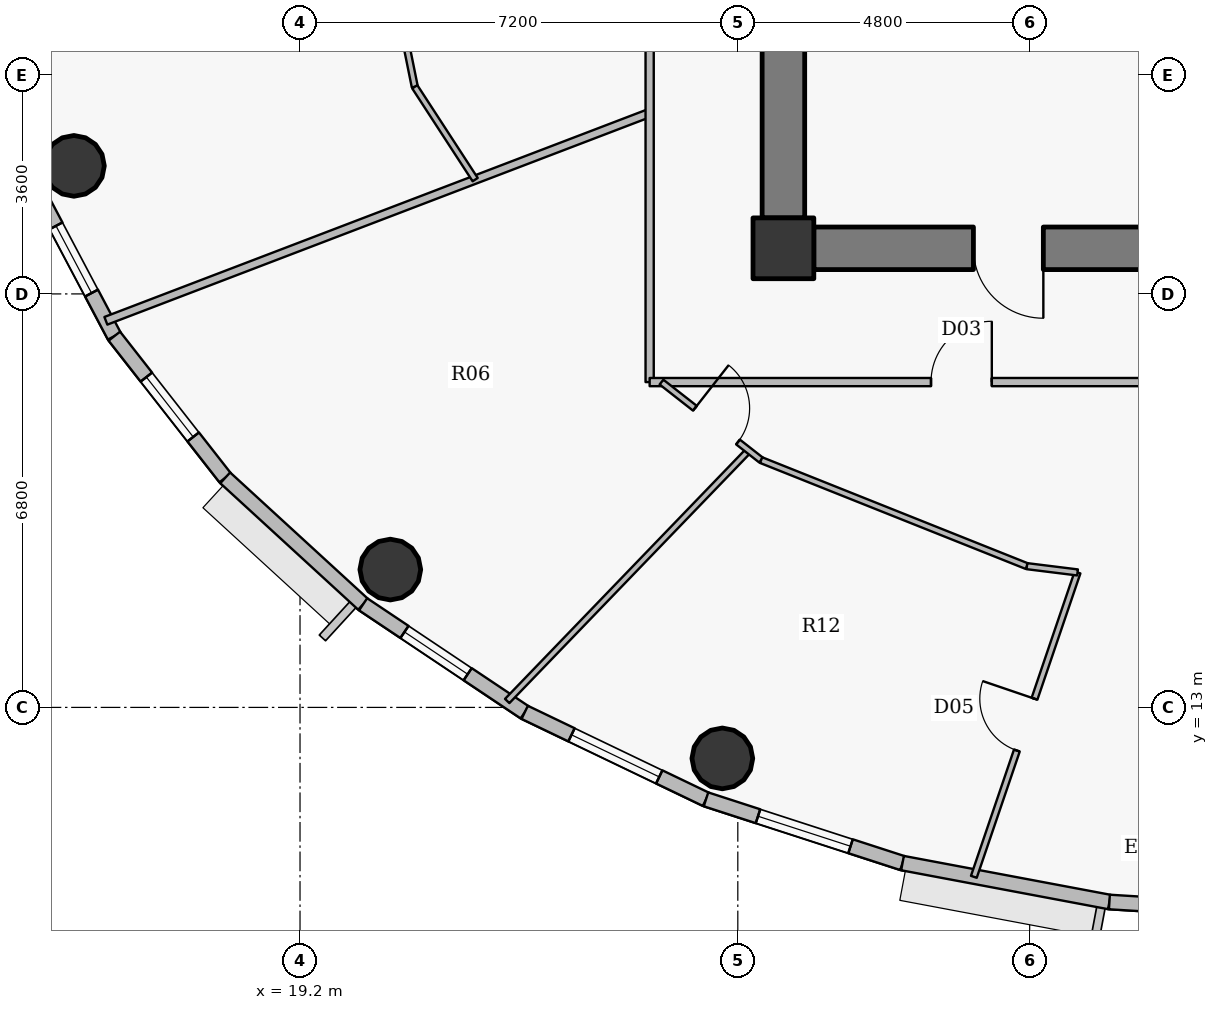
"""IFC4 building model, lengths in metres.
Left out: names, types, materials, properties, quantities, classifications, styles, units other than length and angle.
Written with IfcOpenShell. Run it as: python <this file> out.ifc"""

import sys

from ifc_helpers import new_model, si_unit, direction, frame, frame_2d, origin, origin_2d, place, context, subcontext, project, spatial, rectangle, hollow_circle, extrude, source, transform, mapped, element, fill, save


model = new_model("IFC4")
c1 = context("Model", 3, precision=1e-05, world=origin(), true_north=direction((0.0, 1.0)))
c2 = subcontext(c1, "Body", "Model", "MODEL_VIEW")
j1 = project(units=[si_unit("LENGTHUNIT", "METRE"), si_unit("PLANEANGLEUNIT", "RADIAN")], contexts=[c1])
p1 = place(None, origin())
s1 = spatial("IfcSite", under=j1, at=p1, CompositionType="ELEMENT")
p2 = place(p1, origin())
s2 = spatial("IfcBuilding", under=s1, at=p2, CompositionType="ELEMENT")
p3 = place(p2, frame((0.0, 0.0, 284.25)))
s3 = spatial("IfcBuildingStorey", under=s2, at=p3, CompositionType="ELEMENT", Elevation=284.25)
p4 = place(p3, frame((27.15, 20.55, 0.0), z_axis=(0.0, 0.0, 1.0), x_axis=(1.0, 0.0, 0.0)))
e1 = element("IfcColumn", 1, at=p4, inside=s3, PredefinedType="COLUMN", context=c2, shape_type="SweptSolid", body=[
    extrude(rectangle(XDim=1.0, YDim=1.0, at=origin_2d()), origin(), (0.0, 0.0, 1.0), 3.75),
])
p5 = place(p3, frame((44.35, 20.55, 0.0), z_axis=(0.0, 0.0, 1.0), x_axis=(-1.0, 0.0, 0.0)))
e2 = element("IfcWall", 2, at=p5, inside=s3, PredefinedType="SHEAR", context=c2, shape_type="SweptSolid", body=[
    extrude(rectangle(XDim=16.7, YDim=0.7, at=frame_2d((8.35, 0.0))), origin(), (0.0, 0.0, 1.0), 3.05),
])
p6 = place(p5, frame((12.925, 0.0, 0.0)))
e3 = element("IfcOpeningElement", 3, at=p6, cuts=e2, PredefinedType="OPENING", context=c2, shape_type="SweptSolid", body=[
    extrude(rectangle(XDim=1.15, YDim=2.15, at=origin_2d()), frame((0.575, 0.36, 1.075), z_axis=(0.0, -1.0, 0.0), x_axis=(1.0, 0.0, 0.0)), (0.0, 0.0, 1.0), 0.72),
])
p7 = place(p5, frame((9.1, 0.0, 0.0)))
e4 = element("IfcOpeningElement", 4, at=p7, cuts=e2, PredefinedType="OPENING", context=c2, shape_type="SweptSolid", body=[
    extrude(rectangle(XDim=1.15, YDim=2.15, at=origin_2d()), frame((0.575, 0.36, 1.075), z_axis=(0.0, -1.0, 0.0), x_axis=(1.0, 0.0, 0.0)), (0.0, 0.0, 1.0), 0.72),
])
p8 = place(p3, frame((27.15, 21.05, 0.0), z_axis=(0.0, 0.0, 1.0), x_axis=(0.0, 1.0, 0.0)))
e5 = element("IfcWall", 5, at=p8, inside=s3, PredefinedType="SHEAR", context=c2, shape_type="SweptSolid", body=[
    extrude(rectangle(XDim=11.9, YDim=0.7, at=frame_2d((5.95, 0.0))), origin(), (0.0, 0.0, 1.0), 3.05),
])
for number, where, z_axis, x_axis in (
    (6, (15.481, 21.906, 0.0), (0.0, 0.0, 1.0), (1.0, 0.0, 0.0)),
    (7, (20.685, 15.267, 0.0), (0.0, 0.0, 1.0), (1.0, 0.0, 0.0)),
    (8, (26.146, 12.161, 0.0), (0.0, 0.0, 1.0), (1.0, 0.0, 0.0)),
):
    element("IfcColumn", number, at=place(p3, frame(where, z_axis=z_axis, x_axis=x_axis)), inside=s3, PredefinedType="COLUMN", context=c2, shape_type="SweptSolid", body=[
        extrude(hollow_circle(Radius=0.5, WallThickness=0.032, at=origin_2d()), origin(), (0.0, 0.0, 1.0), 3.75),
    ])
p9 = place(p3, frame((16.146, 19.105, 0.0), z_axis=(0.0, 0.0, 1.0), x_axis=(-0.467628269026, 0.883925224218, 0.0)))
e9 = element("IfcWall", 9, at=p9, inside=s3, PredefinedType="SOLIDWALL", context=c2, shape_type="SweptSolid", body=[
    extrude(rectangle(XDim=2.854, YDim=0.24, at=frame_2d((1.427, 0.0))), origin(), (0.0, 0.0, 1.0), 3.5),
])
p10 = place(p9, frame((0.802, 0.0, 0.9)))
e10 = element("IfcOpeningElement", 10, at=p10, cuts=e9, PredefinedType="OPENING", context=c2, shape_type="SweptSolid", body=[
    extrude(rectangle(XDim=1.25, YDim=1.65, at=origin_2d()), frame((0.625, 0.13, 0.825), z_axis=(0.0, -1.0, 0.0), x_axis=(1.0, 0.0, 0.0)), (0.0, 0.0, 1.0), 0.26),
])
p11 = place(p3, frame((17.97, 16.775, 0.0), z_axis=(0.0, 0.0, 1.0), x_axis=(-0.616337186556, 0.787482363275, 0.0)))
e11 = element("IfcWall", 11, at=p11, inside=s3, PredefinedType="SOLIDWALL", context=c2, shape_type="SweptSolid", body=[
    extrude(rectangle(XDim=2.958, YDim=0.24, at=frame_2d((1.479, 0.0))), origin(), (0.0, 0.0, 1.0), 3.5),
])
p12 = place(p11, frame((0.854, 0.0, 0.9)))
e12 = element("IfcOpeningElement", 12, at=p12, cuts=e11, PredefinedType="OPENING", context=c2, shape_type="SweptSolid", body=[
    extrude(rectangle(XDim=1.25, YDim=1.65, at=origin_2d()), frame((0.625, 0.13, 0.825), z_axis=(0.0, -1.0, 0.0), x_axis=(1.0, 0.0, 0.0)), (0.0, 0.0, 1.0), 0.26),
])
p13 = place(p3, frame((20.238, 14.696, 0.0), z_axis=(0.0, 0.0, 1.0), x_axis=(-0.737068506972, 0.675818034703, 0.0)))
e13 = element("IfcWall", 13, at=p13, inside=s3, PredefinedType="SOLIDWALL", context=c2, shape_type="SweptSolid", body=[
    extrude(rectangle(XDim=3.077, YDim=0.24, at=frame_2d((1.539, 0.0))), origin(), (0.0, 0.0, 1.0), 3.5),
])
p14 = place(p3, frame((22.896, 12.918, 0.0), z_axis=(0.0, 0.0, 1.0), x_axis=(-0.831250592635, 0.55589787933, 0.0)))
e14 = element("IfcWall", 14, at=p14, inside=s3, PredefinedType="SOLIDWALL", context=c2, shape_type="SweptSolid", body=[
    extrude(rectangle(XDim=3.197, YDim=0.24, at=frame_2d((1.599, 0.0))), origin(), (0.0, 0.0, 1.0), 3.5),
])
p15 = place(p14, frame((1.129, 0.0, 0.9)))
e15 = element("IfcOpeningElement", 15, at=p15, cuts=e14, PredefinedType="OPENING", context=c2, shape_type="SweptSolid", body=[
    extrude(rectangle(XDim=1.25, YDim=1.65, at=origin_2d()), frame((0.625, 0.13, 0.825), z_axis=(0.0, -1.0, 0.0), x_axis=(1.0, 0.0, 0.0)), (0.0, 0.0, 1.0), 0.26),
])
p16 = place(p3, frame((25.877, 11.488, 0.0), z_axis=(0.0, 0.0, 1.0), x_axis=(-0.901573741254, 0.43262546051, 0.0)))
e16 = element("IfcWall", 16, at=p16, inside=s3, PredefinedType="SOLIDWALL", context=c2, shape_type="SweptSolid", body=[
    extrude(rectangle(XDim=3.307, YDim=0.24, at=frame_2d((1.653, 0.0))), origin(), (0.0, 0.0, 1.0), 3.5),
])
p17 = place(p16, frame((0.853, 0.0, 0.9)))
e17 = element("IfcOpeningElement", 17, at=p17, cuts=e16, PredefinedType="OPENING", context=c2, shape_type="SweptSolid", body=[
    extrude(rectangle(XDim=1.6, YDim=1.75, at=origin_2d()), frame((0.8, 0.13, 0.875), z_axis=(0.0, -1.0, 0.0), x_axis=(1.0, 0.0, 0.0)), (0.0, 0.0, 1.0), 0.26),
])
p18 = place(p3, frame((29.109, 10.44, 0.0), z_axis=(0.0, 0.0, 1.0), x_axis=(-0.95123136723, 0.308478339592, 0.0)))
e18 = element("IfcWall", 18, at=p18, inside=s3, PredefinedType="SOLIDWALL", context=c2, shape_type="SweptSolid", body=[
    extrude(rectangle(XDim=3.398, YDim=0.24, at=frame_2d((1.699, 0.0))), origin(), (0.0, 0.0, 1.0), 3.5),
])
p19 = place(p18, frame((0.899, 0.0, 0.9)))
e19 = element("IfcOpeningElement", 19, at=p19, cuts=e18, PredefinedType="OPENING", context=c2, shape_type="SweptSolid", body=[
    extrude(rectangle(XDim=1.6, YDim=1.75, at=origin_2d()), frame((0.8, 0.13, 0.875), z_axis=(0.0, -1.0, 0.0), x_axis=(1.0, 0.0, 0.0)), (0.0, 0.0, 1.0), 0.26),
])
p20 = place(p3, frame((32.511, 9.8, 0.0), z_axis=(0.0, 0.0, 1.0), x_axis=(-0.982782655757, 0.184765395959, 0.0)))
e20 = element("IfcWall", 20, at=p20, inside=s3, PredefinedType="SOLIDWALL", context=c2, shape_type="SweptSolid", body=[
    extrude(rectangle(XDim=3.462, YDim=0.24, at=frame_2d((1.731, 0.0))), origin(), (0.0, 0.0, 1.0), 3.5),
])
p21 = place(p3, frame((36.0, 9.585, 0.0), z_axis=(0.0, 0.0, 1.0), x_axis=(-0.998104946479, 0.061534671648, 0.0)))
e21 = element("IfcWall", 21, at=p21, inside=s3, PredefinedType="SOLIDWALL", context=c2, shape_type="SweptSolid", body=[
    extrude(rectangle(XDim=3.495, YDim=0.24, at=frame_2d((1.748, 0.0))), origin(), (0.0, 0.0, 1.0), 3.5),
])
p22 = place(p21, frame((1.123, 0.0, 0.9)))
e22 = element("IfcOpeningElement", 22, at=p22, cuts=e21, PredefinedType="OPENING", context=c2, shape_type="SweptSolid", body=[
    extrude(rectangle(XDim=1.25, YDim=1.65, at=origin_2d()), frame((0.625, 0.13, 0.825), z_axis=(0.0, -1.0, 0.0), x_axis=(1.0, 0.0, 0.0)), (0.0, 0.0, 1.0), 0.26),
])
p23 = place(p3, frame((16.007, 19.358, 0.0), z_axis=(0.0, 0.0, 1.0), x_axis=(0.934094110355, 0.35702687994, 0.0)))
e23 = element("IfcWall", 23, at=p23, inside=s3, PredefinedType="PARTITIONING", context=c2, shape_type="SweptSolid", body=[
    extrude(rectangle(XDim=9.574, YDim=0.135, at=frame_2d((4.787, 0.0))), origin(), (0.0, 0.0, 1.0), 2.985),
])
p24 = place(p3, frame((20.32, 27.0, 0.0), z_axis=(0.0, 0.0, 1.0), x_axis=(0.198226068862, -0.980156327135, 0.0)))
e24 = element("IfcWall", 24, at=p24, inside=s3, PredefinedType="PARTITIONING", context=c2, shape_type="SweptSolid", body=[
    extrude(rectangle(XDim=3.871, YDim=0.1, at=frame_2d((1.936, 0.0))), origin(), (0.0, 0.0, 1.0), 3.035),
])
p25 = place(p3, frame((21.087, 23.206, 0.0), z_axis=(0.0, 0.0, 1.0), x_axis=(0.545384128846, -0.838186227519, 0.0)))
e25 = element("IfcWall", 25, at=p25, inside=s3, PredefinedType="PARTITIONING", context=c2, shape_type="SweptSolid", body=[
    extrude(rectangle(XDim=1.821, YDim=0.1, at=frame_2d((0.911, 0.0))), origin(), (0.0, 0.0, 1.0), 3.035),
])
p26 = place(p3, frame((22.607, 13.105, 0.0), z_axis=(0.0, 0.0, 1.0), x_axis=(0.693978480191, 0.71999574237, 0.0)))
e26 = element("IfcWall", 26, at=p26, inside=s3, PredefinedType="PARTITIONING", context=c2, shape_type="SweptSolid", body=[
    extrude(rectangle(XDim=5.724, YDim=0.1, at=frame_2d((2.862, 0.0))), origin(), (0.0, 0.0, 1.0), 2.985),
])
p27 = place(p3, frame((24.95, 18.35, 0.0), z_axis=(0.0, 0.0, 1.0), x_axis=(0.0, 1.0, 0.0)))
e27 = element("IfcWall", 27, at=p27, inside=s3, PredefinedType="PARTITIONING", context=c2, shape_type="SweptSolid", body=[
    extrude(rectangle(XDim=17.147, YDim=0.135, at=frame_2d((8.574, 0.0))), origin(), (0.0, 0.0, 1.0), 3.035),
])
p28 = place(p27, frame((10.267, 0.0, 0.0)))
e28 = element("IfcOpeningElement", 28, at=p28, cuts=e27, PredefinedType="OPENING", context=c2, shape_type="SweptSolid", body=[
    extrude(rectangle(XDim=1.0, YDim=2.15, at=origin_2d()), frame((0.5, 0.078, 1.075), z_axis=(0.0, -1.0, 0.0), x_axis=(1.0, 0.0, 0.0)), (0.0, 0.0, 1.0), 0.155),
])
p29 = place(p3, frame((24.95, 18.35, 0.0), z_axis=(0.0, 0.0, 1.0), x_axis=(1.0, 0.0, 0.0)))
e29 = element("IfcWall", 29, at=p29, inside=s3, PredefinedType="PARTITIONING", context=c2, shape_type="SweptSolid", body=[
    extrude(rectangle(XDim=10.1, YDim=0.135, at=frame_2d((5.05, 0.0))), origin(), (0.0, 0.0, 1.0), 3.035),
])
p30 = place(p29, frame((4.627, 0.0, 0.0)))
e30 = element("IfcOpeningElement", 30, at=p30, cuts=e29, PredefinedType="OPENING", context=c2, shape_type="SweptSolid", body=[
    extrude(rectangle(XDim=1.0, YDim=2.15, at=origin_2d()), frame((0.5, 0.078, 1.075), z_axis=(0.0, -1.0, 0.0), x_axis=(1.0, 0.0, 0.0)), (0.0, 0.0, 1.0), 0.155),
])
p31 = place(p3, frame((25.145, 18.35, 0.0), z_axis=(0.0, 0.0, 1.0), x_axis=(0.787326747019, -0.616535962803, 0.0)))
e31 = element("IfcWall", 31, at=p31, inside=s3, PredefinedType="PARTITIONING", context=c2, shape_type="SweptSolid", body=[
    extrude(rectangle(XDim=2.081, YDim=0.1, at=frame_2d((1.041, 0.0))), origin(), (0.0, 0.0, 1.0), 3.5),
])
p32 = place(p31, frame((0.698, 0.0, 0.0)))
e32 = element("IfcOpeningElement", 32, at=p32, cuts=e31, PredefinedType="OPENING", context=c2, shape_type="SweptSolid", body=[
    extrude(rectangle(XDim=0.9, YDim=2.1, at=origin_2d()), frame((0.45, 0.06, 1.05), z_axis=(0.0, -1.0, 0.0), x_axis=(1.0, 0.0, 0.0)), (0.0, 0.0, 1.0), 0.12),
])
p33 = place(p3, frame((26.783, 17.067, 0.0), z_axis=(0.0, 0.0, 1.0), x_axis=(0.928809047774, -0.370558703544, 0.0)))
e33 = element("IfcWall", 33, at=p33, inside=s3, PredefinedType="PARTITIONING", context=c2, shape_type="SweptSolid", body=[
    extrude(rectangle(XDim=4.706, YDim=0.1, at=frame_2d((2.353, 0.0))), origin(), (0.0, 0.0, 1.0), 3.035),
])
p34 = place(p3, frame((30.282, 10.214, 0.0), z_axis=(0.0, 0.0, 1.0), x_axis=(0.322425759237, 0.946594754782, 0.0)))
e34 = element("IfcWall", 34, at=p34, inside=s3, PredefinedType="PARTITIONING", context=c2, shape_type="SweptSolid", body=[
    extrude(rectangle(XDim=5.288, YDim=0.1, at=frame_2d((2.644, 0.0))), origin(), (0.0, 0.0, 1.0), 2.985),
])
p35 = place(p34, frame((2.194, 0.0, 0.0)))
e35 = element("IfcOpeningElement", 35, at=p35, cuts=e34, PredefinedType="OPENING", context=c2, shape_type="SweptSolid", body=[
    extrude(rectangle(XDim=0.9, YDim=2.1, at=origin_2d()), frame((0.45, 0.06, 1.05), z_axis=(0.0, -1.0, 0.0), x_axis=(1.0, 0.0, 0.0)), (0.0, 0.0, 1.0), 0.12),
])
p36 = place(p3, frame((31.155, 15.323, 0.0), z_axis=(0.0, 0.0, 1.0), x_axis=(0.992393849535, -0.123103401277, 0.0)))
e36 = element("IfcWall", 36, at=p36, inside=s3, PredefinedType="PARTITIONING", context=c2, shape_type="SweptSolid", body=[
    extrude(rectangle(XDim=0.839, YDim=0.1, at=frame_2d((0.419, 0.0))), origin(), (0.0, 0.0, 1.0), 3.5),
])
p37 = place(p3, frame((26.8, 21.04, 0.0), z_axis=(0.0, 0.0, 1.0), x_axis=(0.0, -1.0, 0.0)))
e37 = element("IfcWall", 37, at=p37, inside=s3, PredefinedType="PARTITIONING", context=c2, shape_type="SweptSolid", body=[
    extrude(rectangle(XDim=0.84, YDim=0.135, at=frame_2d((0.42, 0.0))), origin(), (0.0, 0.0, 1.0), 3.035),
])
p38 = place(p3, frame((27.107, 20.2, 0.0), z_axis=(0.0, 0.0, 1.0), x_axis=(1.0, 0.0, 0.0)))
e38 = element("IfcWall", 38, at=p38, inside=s3, PredefinedType="PARTITIONING", context=c2, shape_type="SweptSolid", body=[
    extrude(rectangle(XDim=0.532, YDim=0.135, at=frame_2d((0.266, 0.0))), origin(), (0.0, 0.0, 1.0), 3.035),
])
m1 = source(origin(), c2, "Body", "SweptSolid", [
    extrude(rectangle(XDim=1.25, YDim=1.65, at=origin_2d()), frame((0.625, 0.03, 0.825), z_axis=(0.0, -1.0, 0.0), x_axis=(1.0, 0.0, 0.0)), (0.0, 0.0, 1.0), 0.06),
])
p39 = place(p12, origin())
e39 = element("IfcWindow", 39, at=p39, inside=s3, PartitioningType="SINGLE_PANEL", PredefinedType="WINDOW", context=c2, shape_type="MappedRepresentation", body=[
    mapped(m1, transform((0.0, 0.0, 0.0), x_axis=(1.0, 0.0, 0.0), y_axis=(0.0, 1.0, 0.0), z_axis=(0.0, 0.0, 1.0), scale=1.0)),
])
fill(e12, e39)
p40 = place(p15, origin())
e40 = element("IfcWindow", 40, at=p40, inside=s3, PartitioningType="SINGLE_PANEL", PredefinedType="WINDOW", context=c2, shape_type="MappedRepresentation", body=[
    mapped(m1, transform((0.0, 0.0, 0.0), x_axis=(1.0, 0.0, 0.0), y_axis=(0.0, 1.0, 0.0), z_axis=(0.0, 0.0, 1.0), scale=1.0)),
])
fill(e15, e40)
m2 = source(origin(), c2, "Body", "SweptSolid", [
    extrude(rectangle(XDim=1.6, YDim=1.75, at=origin_2d()), frame((0.8, 0.03, 0.875), z_axis=(0.0, -1.0, 0.0), x_axis=(1.0, 0.0, 0.0)), (0.0, 0.0, 1.0), 0.06),
])
p41 = place(p17, origin())
e41 = element("IfcWindow", 41, at=p41, inside=s3, PartitioningType="DOUBLE_PANEL_VERTICAL", PredefinedType="WINDOW", context=c2, shape_type="MappedRepresentation", body=[
    mapped(m2, transform((0.0, 0.0, 0.0), x_axis=(1.0, 0.0, 0.0), y_axis=(0.0, 1.0, 0.0), z_axis=(0.0, 0.0, 1.0), scale=1.0)),
])
fill(e17, e41)
p42 = place(p19, origin())
e42 = element("IfcWindow", 42, at=p42, inside=s3, PartitioningType="DOUBLE_PANEL_VERTICAL", PredefinedType="WINDOW", context=c2, shape_type="MappedRepresentation", body=[
    mapped(m2, transform((0.0, 0.0, 0.0), x_axis=(1.0, 0.0, 0.0), y_axis=(0.0, 1.0, 0.0), z_axis=(0.0, 0.0, 1.0), scale=1.0)),
])
fill(e19, e42)
p43 = place(p10, origin())
e43 = element("IfcWindow", 43, at=p43, inside=s3, PartitioningType="SINGLE_PANEL", PredefinedType="WINDOW", context=c2, shape_type="MappedRepresentation", body=[
    mapped(m1, transform((0.0, 0.0, 0.0), x_axis=(1.0, 0.0, 0.0), y_axis=(0.0, 1.0, 0.0), z_axis=(0.0, 0.0, 1.0), scale=1.0)),
])
fill(e10, e43)
m3 = source(origin(), c2, "Body", "SweptSolid", [
    extrude(rectangle(XDim=1.15, YDim=2.15, at=origin_2d()), frame((0.575, 0.025, 1.075), z_axis=(0.0, -1.0, 0.0), x_axis=(1.0, 0.0, 0.0)), (0.0, 0.0, 1.0), 0.05),
])
p44 = place(p6, origin())
e44 = element("IfcDoor", 44, at=p44, inside=s3, OperationType="SINGLE_SWING_LEFT", PredefinedType="DOOR", context=c2, shape_type="MappedRepresentation", body=[
    mapped(m3, transform((0.0, 0.0, 0.0), x_axis=(1.0, 0.0, 0.0), y_axis=(0.0, 1.0, 0.0), z_axis=(0.0, 0.0, 1.0), scale=1.0)),
])
fill(e3, e44)
m4 = source(origin(), c2, "Body", "SweptSolid", [
    extrude(rectangle(XDim=1.0, YDim=2.15, at=origin_2d()), frame((0.5, 0.025, 1.075), z_axis=(0.0, -1.0, 0.0), x_axis=(1.0, 0.0, 0.0)), (0.0, 0.0, 1.0), 0.05),
])
p45 = place(p30, origin())
e45 = element("IfcDoor", 45, at=p45, inside=s3, OperationType="SINGLE_SWING_RIGHT", PredefinedType="DOOR", context=c2, shape_type="MappedRepresentation", body=[
    mapped(m4, transform((0.0, 0.0, 0.0), x_axis=(1.0, 0.0, 0.0), y_axis=(0.0, 1.0, 0.0), z_axis=(0.0, 0.0, 1.0), scale=1.0)),
])
fill(e30, e45)
m5 = source(origin(), c2, "Body", "SweptSolid", [
    extrude(rectangle(XDim=0.9, YDim=2.1, at=origin_2d()), frame((0.45, 0.025, 1.05), z_axis=(0.0, -1.0, 0.0), x_axis=(1.0, 0.0, 0.0)), (0.0, 0.0, 1.0), 0.05),
])
p46 = place(p32, origin())
e46 = element("IfcDoor", 46, at=p46, inside=s3, OperationType="SINGLE_SWING_LEFT", PredefinedType="DOOR", context=c2, shape_type="MappedRepresentation", body=[
    mapped(m5, transform((0.0, 0.0, 0.0), x_axis=(1.0, 0.0, 0.0), y_axis=(0.0, 1.0, 0.0), z_axis=(0.0, 0.0, 1.0), scale=1.0)),
])
fill(e32, e46)
p47 = place(p35, origin())
e47 = element("IfcDoor", 47, at=p47, inside=s3, OperationType="SINGLE_SWING_RIGHT", PredefinedType="DOOR", context=c2, shape_type="MappedRepresentation", body=[
    mapped(m5, transform((0.0, 0.0, 0.0), x_axis=(1.0, 0.0, 0.0), y_axis=(0.0, 1.0, 0.0), z_axis=(0.0, 0.0, 1.0), scale=1.0)),
])
fill(e35, e47)
save(model, sys.argv[1])
